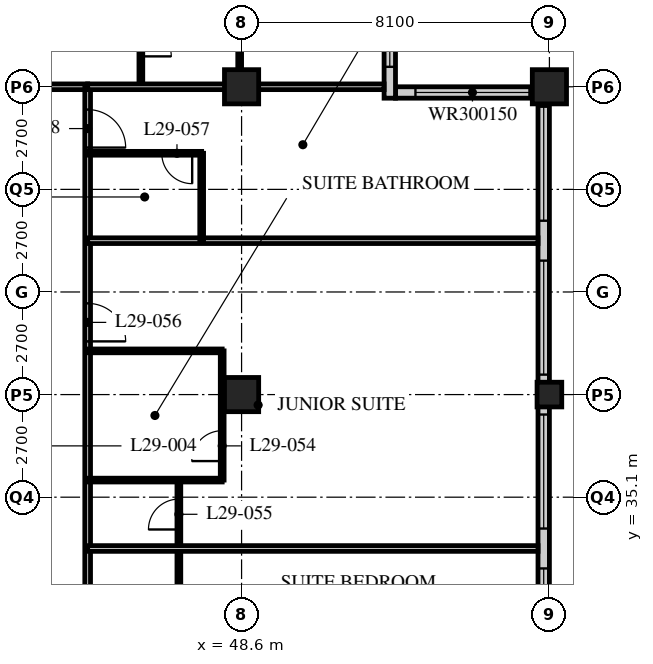
"""IFC4 building model, lengths in metres.
Left out: names, types, materials, properties, quantities, classifications, styles, units other than length and angle.
Written with IfcOpenShell. Run it as: python <this file> out.ifc"""

import sys

from ifc_helpers import new_model, si_unit, direction, frame, frame_2d, origin, origin_2d, place, context, subcontext, project, spatial, rectangle, hollow_rectangle, extrude, element, fill, save


model = new_model("IFC4")
c1 = context("Model", 3, precision=1e-05, world=origin(), true_north=direction((0.0, 1.0)))
c2 = subcontext(c1, "Body", "Model", "MODEL_VIEW")
j1 = project(units=[si_unit("LENGTHUNIT", "METRE"), si_unit("PLANEANGLEUNIT", "RADIAN")], contexts=[c1])
p1 = place(None, origin())
s1 = spatial("IfcSite", under=j1, at=p1, CompositionType="ELEMENT")
p2 = place(p1, origin())
s2 = spatial("IfcBuilding", under=s1, at=p2, CompositionType="ELEMENT")
p3 = place(p2, frame((0.0, 0.0, 117.0)))
s3 = spatial("IfcBuildingStorey", under=s2, at=p3, CompositionType="ELEMENT", Elevation=117.0)
for number, where, z_axis, x_axis in (
    (1, (48.6, 37.8, 0.0), (0.0, 0.0, 1.0), (1.0, 0.0, 0.0)),
    (2, (48.6, 45.9, 0.0), (0.0, 0.0, 1.0), (1.0, 0.0, 0.0)),
):
    element("IfcColumn", number, at=place(p3, frame(where, z_axis=z_axis, x_axis=x_axis)), inside=s3, PredefinedType="COLUMN", context=c2, shape_type="SweptSolid", body=[
        extrude(hollow_rectangle(XDim=0.9, YDim=0.9, WallThickness=0.09, at=origin_2d()), origin(), (0.0, 0.0, 1.0), 3.4),
    ])
p4 = place(p3, frame((56.7, 37.8, 0.0), z_axis=(0.0, 0.0, 1.0), x_axis=(1.0, 0.0, 0.0)))
e3 = element("IfcColumn", 3, at=p4, inside=s3, PredefinedType="COLUMN", context=c2, shape_type="SweptSolid", body=[
    extrude(hollow_rectangle(XDim=0.65, YDim=0.65, WallThickness=0.055, at=origin_2d()), origin(), (0.0, 0.0, 1.0), 3.4),
])
p5 = place(p3, frame((56.7, 45.9, 0.0), z_axis=(0.0, 0.0, 1.0), x_axis=(1.0, 0.0, 0.0)))
e4 = element("IfcColumn", 4, at=p5, inside=s3, PredefinedType="COLUMN", context=c2, shape_type="SweptSolid", body=[
    extrude(hollow_rectangle(XDim=0.9, YDim=0.9, WallThickness=0.09, at=origin_2d()), origin(), (0.0, 0.0, 1.0), 3.4),
])
p6 = place(p3, frame((56.55, 13.8, 0.0), z_axis=(0.0, 0.0, 1.0), x_axis=(0.0, 1.0, 0.0)))
e5 = element("IfcWall", 5, at=p6, inside=s3, PredefinedType="SOLIDWALL", context=c2, shape_type="SweptSolid", body=[
    extrude(rectangle(XDim=32.1, YDim=0.3, at=frame_2d((16.05, 0.0))), origin(), (0.0, 0.0, 1.0), 3.19),
])
p7 = place(p6, frame((0.225, 0.0, 0.9)))
e6 = element("IfcOpeningElement", 6, at=p7, cuts=e5, PredefinedType="OPENING", context=c2, shape_type="SweptSolid", body=[
    extrude(rectangle(XDim=3.0, YDim=2.0, at=frame_2d((1.5, 1.0))), frame((0.0, 0.16, 0.0), z_axis=(0.0, -1.0, 0.0), x_axis=(1.0, 0.0, 0.0)), (0.0, 0.0, 1.0), 0.32),
])
p8 = place(p6, frame((4.275, 0.0, 0.9)))
e7 = element("IfcOpeningElement", 7, at=p8, cuts=e5, PredefinedType="OPENING", context=c2, shape_type="SweptSolid", body=[
    extrude(rectangle(XDim=3.0, YDim=2.0, at=frame_2d((1.5, 1.0))), frame((0.0, 0.16, 0.0), z_axis=(0.0, -1.0, 0.0), x_axis=(1.0, 0.0, 0.0)), (0.0, 0.0, 1.0), 0.32),
])
p9 = place(p6, frame((8.325, 0.0, 0.9)))
e8 = element("IfcOpeningElement", 8, at=p9, cuts=e5, PredefinedType="OPENING", context=c2, shape_type="SweptSolid", body=[
    extrude(rectangle(XDim=3.0, YDim=2.0, at=frame_2d((1.5, 1.0))), frame((0.0, 0.16, 0.0), z_axis=(0.0, -1.0, 0.0), x_axis=(1.0, 0.0, 0.0)), (0.0, 0.0, 1.0), 0.32),
])
p10 = place(p6, frame((12.375, 0.0, 0.9)))
e9 = element("IfcOpeningElement", 9, at=p10, cuts=e5, PredefinedType="OPENING", context=c2, shape_type="SweptSolid", body=[
    extrude(rectangle(XDim=3.0, YDim=2.0, at=frame_2d((1.5, 1.0))), frame((0.0, 0.16, 0.0), z_axis=(0.0, -1.0, 0.0), x_axis=(1.0, 0.0, 0.0)), (0.0, 0.0, 1.0), 0.32),
])
p11 = place(p6, frame((16.425, 0.0, 0.9)))
e10 = element("IfcOpeningElement", 10, at=p11, cuts=e5, PredefinedType="OPENING", context=c2, shape_type="SweptSolid", body=[
    extrude(rectangle(XDim=3.0, YDim=2.0, at=frame_2d((1.5, 1.0))), frame((0.0, 0.16, 0.0), z_axis=(0.0, -1.0, 0.0), x_axis=(1.0, 0.0, 0.0)), (0.0, 0.0, 1.0), 0.32),
])
p12 = place(p6, frame((20.475, 0.0, 0.9)))
e11 = element("IfcOpeningElement", 11, at=p12, cuts=e5, PredefinedType="OPENING", context=c2, shape_type="SweptSolid", body=[
    extrude(rectangle(XDim=3.0, YDim=2.0, at=frame_2d((1.5, 1.0))), frame((0.0, 0.16, 0.0), z_axis=(0.0, -1.0, 0.0), x_axis=(1.0, 0.0, 0.0)), (0.0, 0.0, 1.0), 0.32),
])
p13 = place(p6, frame((24.525, 0.0, 0.9)))
e12 = element("IfcOpeningElement", 12, at=p13, cuts=e5, PredefinedType="OPENING", context=c2, shape_type="SweptSolid", body=[
    extrude(rectangle(XDim=3.0, YDim=2.0, at=frame_2d((1.5, 1.0))), frame((0.0, 0.16, 0.0), z_axis=(0.0, -1.0, 0.0), x_axis=(1.0, 0.0, 0.0)), (0.0, 0.0, 1.0), 0.32),
])
p14 = place(p6, frame((28.575, 0.0, 0.9)))
e13 = element("IfcOpeningElement", 13, at=p14, cuts=e5, PredefinedType="OPENING", context=c2, shape_type="SweptSolid", body=[
    extrude(rectangle(XDim=3.0, YDim=2.0, at=frame_2d((1.5, 1.0))), frame((0.0, 0.16, 0.0), z_axis=(0.0, -1.0, 0.0), x_axis=(1.0, 0.0, 0.0)), (0.0, 0.0, 1.0), 0.32),
])
p15 = place(p3, frame((56.4, 45.75, 0.0), z_axis=(0.0, 0.0, 1.0), x_axis=(-1.0, 0.0, 0.0)))
e14 = element("IfcWall", 14, at=p15, inside=s3, PredefinedType="SOLIDWALL", context=c2, shape_type="SweptSolid", body=[
    extrude(rectangle(XDim=3.75, YDim=0.3, at=frame_2d((1.875, 0.0))), origin(), (0.0, 0.0, 1.0), 3.19),
])
p16 = place(p15, frame((0.225, 0.0, 0.9)))
e15 = element("IfcOpeningElement", 15, at=p16, cuts=e14, PredefinedType="OPENING", context=c2, shape_type="SweptSolid", body=[
    extrude(rectangle(XDim=3.0, YDim=1.5, at=frame_2d((1.5, 0.75))), frame((0.0, 0.16, 0.0), z_axis=(0.0, -1.0, 0.0), x_axis=(1.0, 0.0, 0.0)), (0.0, 0.0, 1.0), 0.32),
])
p17 = place(p3, frame((52.5, 45.6, 0.0), z_axis=(0.0, 0.0, 1.0), x_axis=(0.0, 1.0, 0.0)))
e16 = element("IfcWall", 16, at=p17, inside=s3, PredefinedType="SOLIDWALL", context=c2, shape_type="SweptSolid", body=[
    extrude(rectangle(XDim=4.35, YDim=0.3, at=frame_2d((2.175, 0.0))), origin(), (0.0, 0.0, 1.0), 3.19),
])
p18 = place(p17, frame((0.825, 0.0, 0.9)))
e17 = element("IfcOpeningElement", 17, at=p18, cuts=e16, PredefinedType="OPENING", context=c2, shape_type="SweptSolid", body=[
    extrude(rectangle(XDim=3.0, YDim=1.5, at=frame_2d((1.5, 0.75))), frame((0.0, 0.16, 0.0), z_axis=(0.0, -1.0, 0.0), x_axis=(1.0, 0.0, 0.0)), (0.0, 0.0, 1.0), 0.32),
])
p19 = place(p3, frame((12.15, 45.9, 0.0), z_axis=(0.0, 0.0, 1.0), x_axis=(1.0, 0.0, 0.0)))
e18 = element("IfcWall", 18, at=p19, inside=s3, PredefinedType="PARTITIONING", context=c2, shape_type="SweptSolid", body=[
    extrude(rectangle(XDim=32.4, YDim=0.15, at=frame_2d((16.2, 0.0))), origin(), (0.0, 0.0, 1.0), 2.578),
])
p20 = place(p19, frame((5.95, 0.0, 0.0)))
e19 = element("IfcOpeningElement", 19, at=p20, cuts=e18, PredefinedType="OPENING", context=c2, shape_type="SweptSolid", body=[
    extrude(rectangle(XDim=1.0, YDim=2.1, at=frame_2d((0.5, 1.05))), frame((0.0, 0.085, 0.0), z_axis=(0.0, -1.0, 0.0), x_axis=(1.0, 0.0, 0.0)), (0.0, 0.0, 1.0), 0.17),
])
p21 = place(p19, frame((14.05, 0.0, 0.0)))
e20 = element("IfcOpeningElement", 20, at=p21, cuts=e18, PredefinedType="OPENING", context=c2, shape_type="SweptSolid", body=[
    extrude(rectangle(XDim=1.0, YDim=2.1, at=frame_2d((0.5, 1.05))), frame((0.0, 0.085, 0.0), z_axis=(0.0, -1.0, 0.0), x_axis=(1.0, 0.0, 0.0)), (0.0, 0.0, 1.0), 0.17),
])
p22 = place(p19, frame((25.7, 0.0, 0.0)))
e21 = element("IfcOpeningElement", 21, at=p22, cuts=e18, PredefinedType="OPENING", context=c2, shape_type="SweptSolid", body=[
    extrude(rectangle(XDim=1.0, YDim=2.1, at=frame_2d((0.5, 1.05))), frame((0.0, 0.085, 0.0), z_axis=(0.0, -1.0, 0.0), x_axis=(1.0, 0.0, 0.0)), (0.0, 0.0, 1.0), 0.17),
])
p23 = place(p19, frame((29.875, 0.0, 0.0)))
e22 = element("IfcOpeningElement", 22, at=p23, cuts=e18, PredefinedType="OPENING", context=c2, shape_type="SweptSolid", body=[
    extrude(rectangle(XDim=1.0, YDim=2.1, at=frame_2d((0.5, 1.05))), frame((0.0, 0.085, 0.0), z_axis=(0.0, -1.0, 0.0), x_axis=(1.0, 0.0, 0.0)), (0.0, 0.0, 1.0), 0.17),
])
p24 = place(p19, frame((1.525, 0.0, 0.0)))
e23 = element("IfcOpeningElement", 23, at=p24, cuts=e18, PredefinedType="OPENING", context=c2, shape_type="SweptSolid", body=[
    extrude(rectangle(XDim=1.0, YDim=2.1, at=frame_2d((0.5, 1.05))), frame((0.0, 0.085, 0.0), z_axis=(0.0, -1.0, 0.0), x_axis=(1.0, 0.0, 0.0)), (0.0, 0.0, 1.0), 0.17),
])
p25 = place(p3, frame((44.55, 17.55, 0.0), z_axis=(0.0, 0.0, 1.0), x_axis=(0.0, 1.0, 0.0)))
e24 = element("IfcWall", 24, at=p25, inside=s3, PredefinedType="PARTITIONING", context=c2, shape_type="SweptSolid", body=[
    extrude(rectangle(XDim=28.35, YDim=0.15, at=frame_2d((14.175, 0.0))), origin(), (0.0, 0.0, 1.0), 3.19),
])
p26 = place(p25, frame((2.75, 0.0, 0.0)))
e25 = element("IfcOpeningElement", 25, at=p26, cuts=e24, PredefinedType="OPENING", context=c2, shape_type="SweptSolid", body=[
    extrude(rectangle(XDim=1.0, YDim=2.1, at=frame_2d((0.5, 1.05))), frame((0.0, 0.085, 0.0), z_axis=(0.0, -1.0, 0.0), x_axis=(1.0, 0.0, 0.0)), (0.0, 0.0, 1.0), 0.17),
])
p27 = place(p25, frame((6.5, 0.0, 0.0)))
e26 = element("IfcOpeningElement", 26, at=p27, cuts=e24, PredefinedType="OPENING", context=c2, shape_type="SweptSolid", body=[
    extrude(rectangle(XDim=1.0, YDim=2.1, at=frame_2d((0.5, 1.05))), frame((0.0, 0.085, 0.0), z_axis=(0.0, -1.0, 0.0), x_axis=(1.0, 0.0, 0.0)), (0.0, 0.0, 1.0), 0.17),
])
p28 = place(p25, frame((10.0, 0.0, 0.0)))
e27 = element("IfcOpeningElement", 27, at=p28, cuts=e24, PredefinedType="OPENING", context=c2, shape_type="SweptSolid", body=[
    extrude(rectangle(XDim=1.0, YDim=2.1, at=frame_2d((0.5, 1.05))), frame((0.0, 0.085, 0.0), z_axis=(0.0, -1.0, 0.0), x_axis=(1.0, 0.0, 0.0)), (0.0, 0.0, 1.0), 0.17),
])
p29 = place(p25, frame((21.65, 0.0, 0.0)))
e28 = element("IfcOpeningElement", 28, at=p29, cuts=e24, PredefinedType="OPENING", context=c2, shape_type="SweptSolid", body=[
    extrude(rectangle(XDim=1.0, YDim=2.1, at=frame_2d((0.5, 1.05))), frame((0.0, 0.085, 0.0), z_axis=(0.0, -1.0, 0.0), x_axis=(1.0, 0.0, 0.0)), (0.0, 0.0, 1.0), 0.17),
])
p30 = place(p25, frame((26.75, 0.0, 0.0)))
e29 = element("IfcOpeningElement", 29, at=p30, cuts=e24, PredefinedType="OPENING", context=c2, shape_type="SweptSolid", body=[
    extrude(rectangle(XDim=1.0, YDim=2.1, at=frame_2d((0.5, 1.05))), frame((0.0, 0.085, 0.0), z_axis=(0.0, -1.0, 0.0), x_axis=(1.0, 0.0, 0.0)), (0.0, 0.0, 1.0), 0.17),
])
p31 = place(p3, frame((46.95, 31.15, 0.0), z_axis=(0.0, 0.0, 1.0), x_axis=(0.0, 1.0, 0.0)))
e30 = element("IfcWall", 30, at=p31, inside=s3, PredefinedType="PARTITIONING", context=c2, shape_type="SweptSolid", body=[
    extrude(rectangle(XDim=4.4, YDim=0.1, at=frame_2d((2.2, 0.0))), origin(), (0.0, 0.0, 1.0), 3.19),
])
p32 = place(p31, frame((3.1, 0.0, 0.0)))
e31 = element("IfcOpeningElement", 31, at=p32, cuts=e30, PredefinedType="OPENING", context=c2, shape_type="SweptSolid", body=[
    extrude(rectangle(XDim=0.8, YDim=2.1, at=frame_2d((0.4, 1.05))), frame((0.0, 0.06, 0.0), z_axis=(0.0, -1.0, 0.0), x_axis=(1.0, 0.0, 0.0)), (0.0, 0.0, 1.0), 0.12),
])
p33 = place(p3, frame((44.55, 33.75, 0.0), z_axis=(0.0, 0.0, 1.0), x_axis=(1.0, 0.0, 0.0)))
e32 = element("IfcWall", 32, at=p33, inside=s3, PredefinedType="PARTITIONING", context=c2, shape_type="SweptSolid", body=[
    extrude(rectangle(XDim=11.85, YDim=0.15, at=frame_2d((5.925, 0.0))), origin(), (0.0, 0.0, 1.0), 3.19),
])
p34 = place(p3, frame((48.09, 35.55, 0.0), z_axis=(0.0, 0.0, 1.0), x_axis=(0.0, 1.0, 0.0)))
e33 = element("IfcWall", 33, at=p34, inside=s3, PredefinedType="PARTITIONING", context=c2, shape_type="SweptSolid", body=[
    extrude(rectangle(XDim=3.4, YDim=0.1, at=frame_2d((1.7, 0.0))), origin(), (0.0, 0.0, 1.0), 3.19),
])
p35 = place(p34, frame((0.5, 0.0, 0.0)))
e34 = element("IfcOpeningElement", 34, at=p35, cuts=e33, PredefinedType="OPENING", context=c2, shape_type="SweptSolid", body=[
    extrude(rectangle(XDim=0.8, YDim=2.1, at=frame_2d((0.4, 1.05))), frame((0.0, 0.06, 0.0), z_axis=(0.0, -1.0, 0.0), x_axis=(1.0, 0.0, 0.0)), (0.0, 0.0, 1.0), 0.12),
])
for number, where, z_axis, x_axis in (
    (35, (44.55, 35.55, 0.0), (0.0, 0.0, 1.0), (1.0, 0.0, 0.0)),
    (36, (44.55, 38.95, 0.0), (0.0, 0.0, 1.0), (1.0, 0.0, 0.0)),
):
    element("IfcWall", number, at=place(p3, frame(where, z_axis=z_axis, x_axis=x_axis)), inside=s3, PredefinedType="PARTITIONING", context=c2, shape_type="SweptSolid", body=[
        extrude(rectangle(XDim=3.54, YDim=0.1, at=frame_2d((1.77, 0.0))), origin(), (0.0, 0.0, 1.0), 3.19),
    ])
p36 = place(p3, frame((44.55, 41.85, 0.0), z_axis=(0.0, 0.0, 1.0), x_axis=(1.0, 0.0, 0.0)))
e37 = element("IfcWall", 37, at=p36, inside=s3, PredefinedType="PARTITIONING", context=c2, shape_type="SweptSolid", body=[
    extrude(rectangle(XDim=11.85, YDim=0.15, at=frame_2d((5.925, 0.0))), origin(), (0.0, 0.0, 1.0), 3.19),
])
p37 = place(p3, frame((47.55, 41.85, 0.0), z_axis=(0.0, 0.0, 1.0), x_axis=(0.0, 1.0, 0.0)))
e38 = element("IfcWall", 38, at=p37, inside=s3, PredefinedType="PARTITIONING", context=c2, shape_type="SweptSolid", body=[
    extrude(rectangle(XDim=2.3, YDim=0.1, at=frame_2d((1.15, 0.0))), origin(), (0.0, 0.0, 1.0), 3.19),
])
p38 = place(p3, frame((44.55, 44.15, 0.0), z_axis=(0.0, 0.0, 1.0), x_axis=(1.0, 0.0, 0.0)))
e39 = element("IfcWall", 39, at=p38, inside=s3, PredefinedType="PARTITIONING", context=c2, shape_type="SweptSolid", body=[
    extrude(rectangle(XDim=3.0, YDim=0.1, at=frame_2d((1.5, 0.0))), origin(), (0.0, 0.0, 1.0), 3.19),
])
p39 = place(p38, frame((1.95, 0.0, 0.0)))
e40 = element("IfcOpeningElement", 40, at=p39, cuts=e39, PredefinedType="OPENING", context=c2, shape_type="SweptSolid", body=[
    extrude(rectangle(XDim=0.8, YDim=2.1, at=frame_2d((0.4, 1.05))), frame((0.0, 0.06, 0.0), z_axis=(0.0, -1.0, 0.0), x_axis=(1.0, 0.0, 0.0)), (0.0, 0.0, 1.0), 0.12),
])
p40 = place(p3, frame((45.95, 45.9, 0.0), z_axis=(0.0, 0.0, 1.0), x_axis=(0.0, 1.0, 0.0)))
e41 = element("IfcWall", 41, at=p40, inside=s3, PredefinedType="PARTITIONING", context=c2, shape_type="SweptSolid", body=[
    extrude(rectangle(XDim=2.4, YDim=0.1, at=frame_2d((1.2, 0.0))), origin(), (0.0, 0.0, 1.0), 3.19),
])
p41 = place(p40, frame((0.8, 0.0, 0.0)))
e42 = element("IfcOpeningElement", 42, at=p41, cuts=e41, PredefinedType="OPENING", context=c2, shape_type="SweptSolid", body=[
    extrude(rectangle(XDim=0.8, YDim=2.1, at=frame_2d((0.4, 1.05))), frame((0.0, 0.06, 0.0), z_axis=(0.0, -1.0, 0.0), x_axis=(1.0, 0.0, 0.0)), (0.0, 0.0, 1.0), 0.12),
])
p42 = place(p3, frame((48.55, 45.9, 0.0), z_axis=(0.0, 0.0, 1.0), x_axis=(0.0, 1.0, 0.0)))
e43 = element("IfcWall", 43, at=p42, inside=s3, PredefinedType="PARTITIONING", context=c2, shape_type="SweptSolid", body=[
    extrude(rectangle(XDim=2.4, YDim=0.1, at=frame_2d((1.2, 0.0))), origin(), (0.0, 0.0, 1.0), 2.578),
])
p43 = place(p3, frame((44.55, 45.9, 0.0), z_axis=(0.0, 0.0, 1.0), x_axis=(1.0, 0.0, 0.0)))
e44 = element("IfcWall", 44, at=p43, inside=s3, PredefinedType="PARTITIONING", context=c2, shape_type="SweptSolid", body=[
    extrude(rectangle(XDim=7.8, YDim=0.15, at=frame_2d((3.9, 0.0))), origin(), (0.0, 0.0, 1.0), 2.578),
])
p44 = place(p11, origin())
e45 = element("IfcWindow", 45, at=p44, inside=s3, PartitioningType="SINGLE_PANEL", PredefinedType="WINDOW", context=c2, shape_type="SweptSolid", body=[
    extrude(rectangle(XDim=3.0, YDim=2.0, at=frame_2d((1.5, 1.0))), frame((0.0, 0.03, 0.0), z_axis=(0.0, -1.0, 0.0), x_axis=(1.0, 0.0, 0.0)), (0.0, 0.0, 1.0), 0.06),
])
fill(e10, e45)
p45 = place(p12, origin())
e46 = element("IfcWindow", 46, at=p45, inside=s3, PartitioningType="SINGLE_PANEL", PredefinedType="WINDOW", context=c2, shape_type="SweptSolid", body=[
    extrude(rectangle(XDim=3.0, YDim=2.0, at=frame_2d((1.5, 1.0))), frame((0.0, 0.03, 0.0), z_axis=(0.0, -1.0, 0.0), x_axis=(1.0, 0.0, 0.0)), (0.0, 0.0, 1.0), 0.06),
])
fill(e11, e46)
p46 = place(p13, origin())
e47 = element("IfcWindow", 47, at=p46, inside=s3, PartitioningType="SINGLE_PANEL", PredefinedType="WINDOW", context=c2, shape_type="SweptSolid", body=[
    extrude(rectangle(XDim=3.0, YDim=2.0, at=frame_2d((1.5, 1.0))), frame((0.0, 0.03, 0.0), z_axis=(0.0, -1.0, 0.0), x_axis=(1.0, 0.0, 0.0)), (0.0, 0.0, 1.0), 0.06),
])
fill(e12, e47)
p47 = place(p14, origin())
e48 = element("IfcWindow", 48, at=p47, inside=s3, PartitioningType="SINGLE_PANEL", PredefinedType="WINDOW", context=c2, shape_type="SweptSolid", body=[
    extrude(rectangle(XDim=3.0, YDim=2.0, at=frame_2d((1.5, 1.0))), frame((0.0, 0.03, 0.0), z_axis=(0.0, -1.0, 0.0), x_axis=(1.0, 0.0, 0.0)), (0.0, 0.0, 1.0), 0.06),
])
fill(e13, e48)
p48 = place(p16, origin())
e49 = element("IfcWindow", 49, at=p48, inside=s3, PartitioningType="SINGLE_PANEL", PredefinedType="WINDOW", context=c2, shape_type="SweptSolid", body=[
    extrude(rectangle(XDim=3.0, YDim=1.5, at=frame_2d((1.5, 0.75))), frame((0.0, 0.03, 0.0), z_axis=(0.0, -1.0, 0.0), x_axis=(1.0, 0.0, 0.0)), (0.0, 0.0, 1.0), 0.06),
])
fill(e15, e49)
p49 = place(p18, origin())
e50 = element("IfcWindow", 50, at=p49, inside=s3, PartitioningType="SINGLE_PANEL", PredefinedType="WINDOW", context=c2, shape_type="SweptSolid", body=[
    extrude(rectangle(XDim=3.0, YDim=1.5, at=frame_2d((1.5, 0.75))), frame((0.0, 0.03, 0.0), z_axis=(0.0, -1.0, 0.0), x_axis=(1.0, 0.0, 0.0)), (0.0, 0.0, 1.0), 0.06),
])
fill(e17, e50)
p50 = place(p35, origin())
e51 = element("IfcDoor", 51, at=p50, inside=s3, OperationType="SINGLE_SWING_LEFT", PredefinedType="DOOR", context=c2, shape_type="SweptSolid", body=[
    extrude(rectangle(XDim=0.8, YDim=2.1, at=frame_2d((0.4, 1.05))), frame((0.0, 0.025, 0.0), z_axis=(0.0, -1.0, 0.0), x_axis=(1.0, 0.0, 0.0)), (0.0, 0.0, 1.0), 0.05),
])
fill(e34, e51)
p51 = place(p32, origin())
e52 = element("IfcDoor", 52, at=p51, inside=s3, OperationType="SINGLE_SWING_LEFT", PredefinedType="DOOR", context=c2, shape_type="SweptSolid", body=[
    extrude(rectangle(XDim=0.8, YDim=2.1, at=frame_2d((0.4, 1.05))), frame((0.0, 0.025, 0.0), z_axis=(0.0, -1.0, 0.0), x_axis=(1.0, 0.0, 0.0)), (0.0, 0.0, 1.0), 0.05),
])
fill(e31, e52)
p52 = place(p29, origin())
e53 = element("IfcDoor", 53, at=p52, inside=s3, OperationType="SINGLE_SWING_RIGHT", PredefinedType="DOOR", context=c2, shape_type="SweptSolid", body=[
    extrude(rectangle(XDim=1.0, YDim=2.1, at=frame_2d((0.5, 1.05))), frame((0.0, 0.025, 0.0), z_axis=(0.0, -1.0, 0.0), x_axis=(1.0, 0.0, 0.0)), (0.0, 0.0, 1.0), 0.05),
])
fill(e28, e53)
p53 = place(p39, origin())
e54 = element("IfcDoor", 54, at=p53, inside=s3, OperationType="SINGLE_SWING_LEFT", PredefinedType="DOOR", context=c2, shape_type="SweptSolid", body=[
    extrude(rectangle(XDim=0.8, YDim=2.1, at=frame_2d((0.4, 1.05))), frame((0.0, 0.025, 0.0), z_axis=(0.0, -1.0, 0.0), x_axis=(1.0, 0.0, 0.0)), (0.0, 0.0, 1.0), 0.05),
])
fill(e40, e54)
p54 = place(p30, origin())
e55 = element("IfcDoor", 55, at=p54, inside=s3, OperationType="SINGLE_SWING_RIGHT", PredefinedType="DOOR", context=c2, shape_type="SweptSolid", body=[
    extrude(rectangle(XDim=1.0, YDim=2.1, at=frame_2d((0.5, 1.05))), frame((0.0, 0.025, 0.0), z_axis=(0.0, -1.0, 0.0), x_axis=(1.0, 0.0, 0.0)), (0.0, 0.0, 1.0), 0.05),
])
fill(e29, e55)
p55 = place(p41, origin())
e56 = element("IfcDoor", 56, at=p55, inside=s3, OperationType="SINGLE_SWING_RIGHT", PredefinedType="DOOR", context=c2, shape_type="SweptSolid", body=[
    extrude(rectangle(XDim=0.8, YDim=2.1, at=frame_2d((0.4, 1.05))), frame((0.0, 0.025, 0.0), z_axis=(0.0, -1.0, 0.0), x_axis=(1.0, 0.0, 0.0)), (0.0, 0.0, 1.0), 0.05),
])
fill(e42, e56)
save(model, sys.argv[1])
